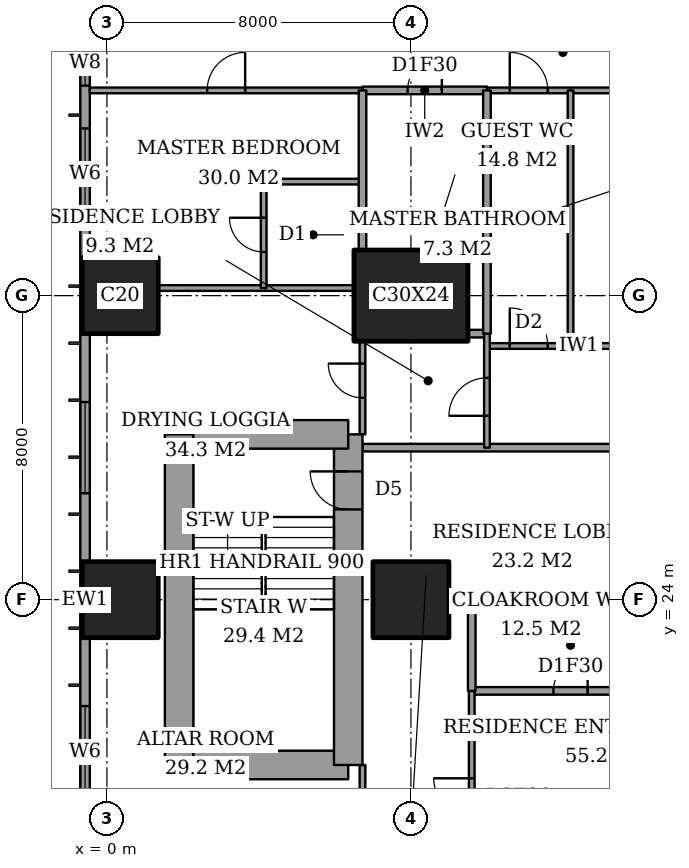
"""IFC4 building model, lengths in metres.
Left out: names, types, materials, properties, quantities, classifications, styles, units other than length and angle.
Written with IfcOpenShell. Run it as: python <this file> out.ifc"""

import sys

from ifc_helpers import new_model, si_unit, direction, frame, frame_2d, origin, origin_2d, place, context, subcontext, project, spatial, rectangle, extrude, element, fill, save


model = new_model("IFC4")
c1 = context("Model", 3, precision=1e-05, world=origin(), true_north=direction((0.0, 1.0)))
c2 = subcontext(c1, "Body", "Model", "MODEL_VIEW")
j1 = project(units=[si_unit("LENGTHUNIT", "METRE"), si_unit("PLANEANGLEUNIT", "RADIAN")], contexts=[c1])
p1 = place(None, origin())
s1 = spatial("IfcSite", under=j1, at=p1, CompositionType="ELEMENT")
p2 = place(p1, origin())
s2 = spatial("IfcBuilding", under=s1, at=p2, CompositionType="ELEMENT")
p3 = place(p2, frame((0.0, 0.0, 87.2)))
s3 = spatial("IfcBuildingStorey", under=s2, at=p3, CompositionType="ELEMENT", Elevation=87.2)
for number, where, z_axis, x_axis in (
    (1, (0.35, 24.0, 0.0), (0.0, 0.0, 1.0), (1.0, 0.0, 0.0)),
    (2, (0.35, 32.0, 0.0), (0.0, 0.0, 1.0), (1.0, 0.0, 0.0)),
    (3, (8.0, 24.0, 0.0), (0.0, 0.0, 1.0), (1.0, 0.0, 0.0)),
):
    element("IfcColumn", number, at=place(p3, frame(where, z_axis=z_axis, x_axis=x_axis)), inside=s3, PredefinedType="COLUMN", context=c2, shape_type="SweptSolid", body=[
        extrude(rectangle(XDim=2.0, YDim=2.0, at=origin_2d()), origin(), (0.0, 0.0, 1.0), 3.6),
    ])
p4 = place(p3, frame((8.0, 32.0, 0.0), z_axis=(0.0, 0.0, 1.0), x_axis=(1.0, 0.0, 0.0)))
e4 = element("IfcColumn", 4, at=p4, inside=s3, PredefinedType="COLUMN", context=c2, shape_type="SweptSolid", body=[
    extrude(rectangle(XDim=3.0, YDim=2.4, at=origin_2d()), origin(), (0.0, 0.0, 1.0), 3.6),
])
p5 = place(p3, frame((1.9, 19.65, 0.0), z_axis=(0.0, 0.0, 1.0), x_axis=(1.0, 0.0, 0.0)))
e5 = element("IfcWall", 5, at=p5, inside=s3, PredefinedType="SHEAR", context=c2, shape_type="SweptSolid", body=[
    extrude(rectangle(XDim=4.45, YDim=0.75, at=frame_2d((2.225, 0.0))), origin(), (0.0, 0.0, 1.0), 3.6),
])
p6 = place(p3, frame((6.35, 19.65, 0.0), z_axis=(0.0, 0.0, 1.0), x_axis=(0.0, 1.0, 0.0)))
e6 = element("IfcWall", 6, at=p6, inside=s3, PredefinedType="SHEAR", context=c2, shape_type="SweptSolid", body=[
    extrude(rectangle(XDim=8.7, YDim=0.75, at=frame_2d((4.35, 0.0))), origin(), (0.0, 0.0, 1.0), 3.6),
])
p7 = place(p6, frame((6.725, 0.0, 0.0)))
e7 = element("IfcOpeningElement", 7, at=p7, cuts=e6, PredefinedType="OPENING", context=c2, shape_type="SweptSolid", body=[
    extrude(rectangle(XDim=1.0, YDim=2.1, at=frame_2d((0.5, 1.05))), frame((0.0, 0.385, 0.0), z_axis=(0.0, -1.0, 0.0), x_axis=(1.0, 0.0, 0.0)), (0.0, 0.0, 1.0), 0.77),
])
p8 = place(p3, frame((6.35, 28.35, 0.0), z_axis=(0.0, 0.0, 1.0), x_axis=(-1.0, 0.0, 0.0)))
e8 = element("IfcWall", 8, at=p8, inside=s3, PredefinedType="SHEAR", context=c2, shape_type="SweptSolid", body=[
    extrude(rectangle(XDim=4.45, YDim=0.75, at=frame_2d((2.225, 0.0))), origin(), (0.0, 0.0, 1.0), 3.6),
])
p9 = place(p3, frame((1.9, 28.35, 0.0), z_axis=(0.0, 0.0, 1.0), x_axis=(0.0, -1.0, 0.0)))
e9 = element("IfcWall", 9, at=p9, inside=s3, PredefinedType="SHEAR", context=c2, shape_type="SweptSolid", body=[
    extrude(rectangle(XDim=8.7, YDim=0.75, at=frame_2d((4.35, 0.0))), origin(), (0.0, 0.0, 1.0), 3.6),
])
p10 = place(p3, frame((-0.575, 44.825, 0.0), z_axis=(0.0, 0.0, 1.0), x_axis=(0.0, -1.0, 0.0)))
e10 = element("IfcWall", 10, at=p10, inside=s3, PredefinedType="SOLIDWALL", context=c2, shape_type="SweptSolid", body=[
    extrude(rectangle(XDim=41.65, YDim=0.25, at=frame_2d((20.825, 0.0))), origin(), (0.0, 0.0, 1.0), 3.6),
])
p11 = place(p10, frame((0.775, 0.0, 0.6)))
e11 = element("IfcOpeningElement", 11, at=p11, cuts=e10, PredefinedType="OPENING", context=c2, shape_type="SweptSolid", body=[
    extrude(rectangle(XDim=2.4, YDim=2.0, at=frame_2d((1.2, 1.0))), frame((0.0, 0.135, 0.0), z_axis=(0.0, -1.0, 0.0), x_axis=(1.0, 0.0, 0.0)), (0.0, 0.0, 1.0), 0.27),
])
p12 = place(p10, frame((6.1, 0.0, 0.6)))
e12 = element("IfcOpeningElement", 12, at=p12, cuts=e10, PredefinedType="OPENING", context=c2, shape_type="SweptSolid", body=[
    extrude(rectangle(XDim=1.2, YDim=2.0, at=frame_2d((0.6, 1.0))), frame((0.0, 0.135, 0.0), z_axis=(0.0, -1.0, 0.0), x_axis=(1.0, 0.0, 0.0)), (0.0, 0.0, 1.0), 0.27),
])
p13 = place(p10, frame((8.425, 0.0, 0.6)))
e13 = element("IfcOpeningElement", 13, at=p13, cuts=e10, PredefinedType="OPENING", context=c2, shape_type="SweptSolid", body=[
    extrude(rectangle(XDim=2.4, YDim=2.0, at=frame_2d((1.2, 1.0))), frame((0.0, 0.135, 0.0), z_axis=(0.0, -1.0, 0.0), x_axis=(1.0, 0.0, 0.0)), (0.0, 0.0, 1.0), 0.27),
])
p14 = place(p10, frame((15.625, 0.0, 0.6)))
e14 = element("IfcOpeningElement", 14, at=p14, cuts=e10, PredefinedType="OPENING", context=c2, shape_type="SweptSolid", body=[
    extrude(rectangle(XDim=2.4, YDim=2.0, at=frame_2d((1.2, 1.0))), frame((0.0, 0.135, 0.0), z_axis=(0.0, -1.0, 0.0), x_axis=(1.0, 0.0, 0.0)), (0.0, 0.0, 1.0), 0.27),
])
p15 = place(p10, frame((23.625, 0.0, 0.6)))
e15 = element("IfcOpeningElement", 15, at=p15, cuts=e10, PredefinedType="OPENING", context=c2, shape_type="SweptSolid", body=[
    extrude(rectangle(XDim=2.4, YDim=2.0, at=frame_2d((1.2, 1.0))), frame((0.0, 0.135, 0.0), z_axis=(0.0, -1.0, 0.0), x_axis=(1.0, 0.0, 0.0)), (0.0, 0.0, 1.0), 0.27),
])
p16 = place(p10, frame((30.825, 0.0, 0.6)))
e16 = element("IfcOpeningElement", 16, at=p16, cuts=e10, PredefinedType="OPENING", context=c2, shape_type="SweptSolid", body=[
    extrude(rectangle(XDim=2.4, YDim=2.0, at=frame_2d((1.2, 1.0))), frame((0.0, 0.135, 0.0), z_axis=(0.0, -1.0, 0.0), x_axis=(1.0, 0.0, 0.0)), (0.0, 0.0, 1.0), 0.27),
])
p17 = place(p10, frame((34.5, 0.0, 0.6)))
e17 = element("IfcOpeningElement", 17, at=p17, cuts=e10, PredefinedType="OPENING", context=c2, shape_type="SweptSolid", body=[
    extrude(rectangle(XDim=1.2, YDim=2.0, at=frame_2d((0.6, 1.0))), frame((0.0, 0.135, 0.0), z_axis=(0.0, -1.0, 0.0), x_axis=(1.0, 0.0, 0.0)), (0.0, 0.0, 1.0), 0.27),
])
p18 = place(p10, frame((38.475, 0.0, 0.6)))
e18 = element("IfcOpeningElement", 18, at=p18, cuts=e10, PredefinedType="OPENING", context=c2, shape_type="SweptSolid", body=[
    extrude(rectangle(XDim=2.4, YDim=2.0, at=frame_2d((1.2, 1.0))), frame((0.0, 0.135, 0.0), z_axis=(0.0, -1.0, 0.0), x_axis=(1.0, 0.0, 0.0)), (0.0, 0.0, 1.0), 0.27),
])
p19 = place(p3, frame((9.6, 21.6, 0.0), z_axis=(0.0, 0.0, 1.0), x_axis=(1.0, 0.0, 0.0)))
e19 = element("IfcWall", 19, at=p19, inside=s3, PredefinedType="PARTITIONING", context=c2, shape_type="SweptSolid", body=[
    extrude(rectangle(XDim=5.2, YDim=0.2, at=frame_2d((2.6, 0.0))), origin(), (0.0, 0.0, 1.0), 3.25),
])
p20 = place(p19, frame((2.15, 0.0, 0.0)))
e20 = element("IfcOpeningElement", 20, at=p20, cuts=e19, PredefinedType="OPENING", context=c2, shape_type="SweptSolid", body=[
    extrude(rectangle(XDim=0.9, YDim=2.1, at=frame_2d((0.45, 1.05))), frame((0.0, 0.11, 0.0), z_axis=(0.0, -1.0, 0.0), x_axis=(1.0, 0.0, 0.0)), (0.0, 0.0, 1.0), 0.22),
])
p21 = place(p3, frame((9.0, 24.0, 0.0), z_axis=(0.0, 0.0, 1.0), x_axis=(1.0, 0.0, 0.0)))
e21 = element("IfcWall", 21, at=p21, inside=s3, PredefinedType="PARTITIONING", context=c2, shape_type="SweptSolid", body=[
    extrude(rectangle(XDim=6.0, YDim=0.2, at=frame_2d((3.0, 0.0))), origin(), (0.0, 0.0, 1.0), 3.25),
])
p22 = place(p3, frame((6.725, 28.0, 0.0), z_axis=(0.0, 0.0, 1.0), x_axis=(1.0, 0.0, 0.0)))
e22 = element("IfcWall", 22, at=p22, inside=s3, PredefinedType="PARTITIONING", context=c2, shape_type="SweptSolid", body=[
    extrude(rectangle(XDim=17.275, YDim=0.2, at=frame_2d((8.637, 0.0))), origin(), (0.0, 0.0, 1.0), 3.25),
])
p23 = place(p22, frame((6.675, 0.0, 0.0)))
e23 = element("IfcOpeningElement", 23, at=p23, cuts=e22, PredefinedType="OPENING", context=c2, shape_type="SweptSolid", body=[
    extrude(rectangle(XDim=1.2, YDim=2.4, at=frame_2d((0.6, 1.2))), frame((0.0, 0.11, 0.0), z_axis=(0.0, -1.0, 0.0), x_axis=(1.0, 0.0, 0.0)), (0.0, 0.0, 1.0), 0.22),
])
p24 = place(p3, frame((10.0, 30.675, 0.0), z_axis=(0.0, 0.0, 1.0), x_axis=(1.0, 0.0, 0.0)))
e24 = element("IfcWall", 24, at=p24, inside=s3, PredefinedType="PARTITIONING", context=c2, shape_type="SweptSolid", body=[
    extrude(rectangle(XDim=4.4, YDim=0.15, at=frame_2d((2.2, 0.0))), origin(), (0.0, 0.0, 1.0), 3.25),
])
p25 = place(p24, frame((0.6, 0.0, 0.0)))
e25 = element("IfcOpeningElement", 25, at=p25, cuts=e24, PredefinedType="OPENING", context=c2, shape_type="SweptSolid", body=[
    extrude(rectangle(XDim=1.0, YDim=2.1, at=frame_2d((0.5, 1.05))), frame((0.0, 0.085, 0.0), z_axis=(0.0, -1.0, 0.0), x_axis=(1.0, 0.0, 0.0)), (0.0, 0.0, 1.0), 0.17),
])
p26 = place(p3, frame((9.5, 31.0, 0.0), z_axis=(0.0, 0.0, 1.0), x_axis=(1.0, 0.0, 0.0)))
e26 = element("IfcWall", 26, at=p26, inside=s3, PredefinedType="PARTITIONING", context=c2, shape_type="SweptSolid", body=[
    extrude(rectangle(XDim=0.5, YDim=0.2, at=frame_2d((0.25, 0.0))), origin(), (0.0, 0.0, 1.0), 3.25),
])
p27 = place(p3, frame((1.35, 32.2, 0.0), z_axis=(0.0, 0.0, 1.0), x_axis=(1.0, 0.0, 0.0)))
e27 = element("IfcWall", 27, at=p27, inside=s3, PredefinedType="PARTITIONING", context=c2, shape_type="SweptSolid", body=[
    extrude(rectangle(XDim=5.15, YDim=0.15, at=frame_2d((2.575, 0.0))), origin(), (0.0, 0.0, 1.0), 3.25),
])
p28 = place(p3, frame((4.125, 35.0, 0.0), z_axis=(0.0, 0.0, 1.0), x_axis=(1.0, 0.0, 0.0)))
e28 = element("IfcWall", 28, at=p28, inside=s3, PredefinedType="PARTITIONING", context=c2, shape_type="SweptSolid", body=[
    extrude(rectangle(XDim=2.6, YDim=0.15, at=frame_2d((1.3, 0.0))), origin(), (0.0, 0.0, 1.0), 3.25),
])
p29 = place(p3, frame((6.725, 37.4, 0.0), z_axis=(0.0, 0.0, 1.0), x_axis=(1.0, 0.0, 0.0)))
e29 = element("IfcWall", 29, at=p29, inside=s3, PredefinedType="PARTITIONING", context=c2, shape_type="SweptSolid", body=[
    extrude(rectangle(XDim=3.275, YDim=0.2, at=frame_2d((1.637, 0.0))), origin(), (0.0, 0.0, 1.0), 3.25),
])
p30 = place(p29, frame((1.188, 0.0, 0.0)))
e30 = element("IfcOpeningElement", 30, at=p30, cuts=e29, PredefinedType="OPENING", context=c2, shape_type="SweptSolid", body=[
    extrude(rectangle(XDim=0.9, YDim=2.1, at=frame_2d((0.45, 1.05))), frame((0.0, 0.11, 0.0), z_axis=(0.0, -1.0, 0.0), x_axis=(1.0, 0.0, 0.0)), (0.0, 0.0, 1.0), 0.22),
])
p31 = place(p3, frame((-0.45, 37.4, 0.0), z_axis=(0.0, 0.0, 1.0), x_axis=(1.0, 0.0, 0.0)))
e31 = element("IfcWall", 31, at=p31, inside=s3, PredefinedType="PARTITIONING", context=c2, shape_type="SweptSolid", body=[
    extrude(rectangle(XDim=7.175, YDim=0.15, at=frame_2d((3.587, 0.0))), origin(), (0.0, 0.0, 1.0), 3.25),
])
p32 = place(p31, frame((3.087, 0.0, 0.0)))
e32 = element("IfcOpeningElement", 32, at=p32, cuts=e31, PredefinedType="OPENING", context=c2, shape_type="SweptSolid", body=[
    extrude(rectangle(XDim=1.0, YDim=2.1, at=frame_2d((0.5, 1.05))), frame((0.0, 0.085, 0.0), z_axis=(0.0, -1.0, 0.0), x_axis=(1.0, 0.0, 0.0)), (0.0, 0.0, 1.0), 0.17),
])
p33 = place(p3, frame((10.0, 37.4, 0.0), z_axis=(0.0, 0.0, 1.0), x_axis=(1.0, 0.0, 0.0)))
e33 = element("IfcWall", 33, at=p33, inside=s3, PredefinedType="PARTITIONING", context=c2, shape_type="SweptSolid", body=[
    extrude(rectangle(XDim=14.561, YDim=0.15, at=frame_2d((7.281, 0.0))), origin(), (0.0, 0.0, 1.0), 3.25),
])
p34 = place(p33, frame((0.6, 0.0, 0.0)))
e34 = element("IfcOpeningElement", 34, at=p34, cuts=e33, PredefinedType="OPENING", context=c2, shape_type="SweptSolid", body=[
    extrude(rectangle(XDim=1.0, YDim=2.1, at=frame_2d((0.5, 1.05))), frame((0.0, 0.085, 0.0), z_axis=(0.0, -1.0, 0.0), x_axis=(1.0, 0.0, 0.0)), (0.0, 0.0, 1.0), 0.17),
])
p35 = place(p33, frame((4.6, 0.0, 0.0)))
e35 = element("IfcOpeningElement", 35, at=p35, cuts=e33, PredefinedType="OPENING", context=c2, shape_type="SweptSolid", body=[
    extrude(rectangle(XDim=1.0, YDim=2.1, at=frame_2d((0.5, 1.05))), frame((0.0, 0.085, 0.0), z_axis=(0.0, -1.0, 0.0), x_axis=(1.0, 0.0, 0.0)), (0.0, 0.0, 1.0), 0.17),
])
p36 = place(p33, frame((10.725, 0.0, 0.0)))
e36 = element("IfcOpeningElement", 36, at=p36, cuts=e33, PredefinedType="OPENING", context=c2, shape_type="SweptSolid", body=[
    extrude(rectangle(XDim=1.0, YDim=2.1, at=frame_2d((0.5, 1.05))), frame((0.0, 0.085, 0.0), z_axis=(0.0, -1.0, 0.0), x_axis=(1.0, 0.0, 0.0)), (0.0, 0.0, 1.0), 0.17),
])
p37 = place(p3, frame((4.125, 32.2, 0.0), z_axis=(0.0, 0.0, 1.0), x_axis=(0.0, 1.0, 0.0)))
e37 = element("IfcWall", 37, at=p37, inside=s3, PredefinedType="PARTITIONING", context=c2, shape_type="SweptSolid", body=[
    extrude(rectangle(XDim=2.8, YDim=0.15, at=frame_2d((1.4, 0.0))), origin(), (0.0, 0.0, 1.0), 3.25),
])
p38 = place(p37, frame((0.95, 0.0, 0.0)))
e38 = element("IfcOpeningElement", 38, at=p38, cuts=e37, PredefinedType="OPENING", context=c2, shape_type="SweptSolid", body=[
    extrude(rectangle(XDim=0.9, YDim=2.1, at=frame_2d((0.45, 1.05))), frame((0.0, 0.085, 0.0), z_axis=(0.0, -1.0, 0.0), x_axis=(1.0, 0.0, 0.0)), (0.0, 0.0, 1.0), 0.17),
])
p39 = place(p3, frame((6.725, 33.2, 0.0), z_axis=(0.0, 0.0, 1.0), x_axis=(0.0, 1.0, 0.0)))
e39 = element("IfcWall", 39, at=p39, inside=s3, PredefinedType="PARTITIONING", context=c2, shape_type="SweptSolid", body=[
    extrude(rectangle(XDim=4.2, YDim=0.2, at=frame_2d((2.1, 0.0))), origin(), (0.0, 0.0, 1.0), 3.25),
])
p40 = place(p3, frame((6.725, 17.2, 0.0), z_axis=(0.0, 0.0, 1.0), x_axis=(0.0, 1.0, 0.0)))
e40 = element("IfcWall", 40, at=p40, inside=s3, PredefinedType="PARTITIONING", context=c2, shape_type="SweptSolid", body=[
    extrude(rectangle(XDim=2.45, YDim=0.15, at=frame_2d((1.225, 0.0))), origin(), (0.0, 0.0, 1.0), 3.25),
])
p41 = place(p40, frame((0.538, 0.0, 0.0)))
e41 = element("IfcOpeningElement", 41, at=p41, cuts=e40, PredefinedType="OPENING", context=c2, shape_type="SweptSolid", body=[
    extrude(rectangle(XDim=1.0, YDim=2.1, at=frame_2d((0.5, 1.05))), frame((0.0, 0.085, 0.0), z_axis=(0.0, -1.0, 0.0), x_axis=(1.0, 0.0, 0.0)), (0.0, 0.0, 1.0), 0.17),
])
p42 = place(p3, frame((6.725, 28.35, 0.0), z_axis=(0.0, 0.0, 1.0), x_axis=(0.0, 1.0, 0.0)))
e42 = element("IfcWall", 42, at=p42, inside=s3, PredefinedType="PARTITIONING", context=c2, shape_type="SweptSolid", body=[
    extrude(rectangle(XDim=2.45, YDim=0.15, at=frame_2d((1.225, 0.0))), origin(), (0.0, 0.0, 1.0), 3.25),
])
p43 = place(p42, frame((0.962, 0.0, 0.0)))
e43 = element("IfcOpeningElement", 43, at=p43, cuts=e42, PredefinedType="OPENING", context=c2, shape_type="SweptSolid", body=[
    extrude(rectangle(XDim=0.9, YDim=2.1, at=frame_2d((0.45, 1.05))), frame((0.0, 0.085, 0.0), z_axis=(0.0, -1.0, 0.0), x_axis=(1.0, 0.0, 0.0)), (0.0, 0.0, 1.0), 0.17),
])
p44 = place(p3, frame((9.6, 21.6, 0.0), z_axis=(0.0, 0.0, 1.0), x_axis=(0.0, 1.0, 0.0)))
e44 = element("IfcWall", 44, at=p44, inside=s3, PredefinedType="PARTITIONING", context=c2, shape_type="SweptSolid", body=[
    extrude(rectangle(XDim=2.4, YDim=0.2, at=frame_2d((1.2, 0.0))), origin(), (0.0, 0.0, 1.0), 3.25),
])
p45 = place(p3, frame((9.6, 10.6, 0.0), z_axis=(0.0, 0.0, 1.0), x_axis=(0.0, 1.0, 0.0)))
e45 = element("IfcWall", 45, at=p45, inside=s3, PredefinedType="PARTITIONING", context=c2, shape_type="SweptSolid", body=[
    extrude(rectangle(XDim=11.0, YDim=0.15, at=frame_2d((5.5, 0.0))), origin(), (0.0, 0.0, 1.0), 3.25),
])
p46 = place(p45, frame((7.7, 0.0, 0.0)))
e46 = element("IfcOpeningElement", 46, at=p46, cuts=e45, PredefinedType="OPENING", context=c2, shape_type="SweptSolid", body=[
    extrude(rectangle(XDim=1.0, YDim=2.1, at=frame_2d((0.5, 1.05))), frame((0.0, 0.085, 0.0), z_axis=(0.0, -1.0, 0.0), x_axis=(1.0, 0.0, 0.0)), (0.0, 0.0, 1.0), 0.17),
])
p47 = place(p3, frame((10.0, 31.0, 0.0), z_axis=(0.0, 0.0, 1.0), x_axis=(0.0, 1.0, 0.0)))
e47 = element("IfcWall", 47, at=p47, inside=s3, PredefinedType="PARTITIONING", context=c2, shape_type="SweptSolid", body=[
    extrude(rectangle(XDim=6.4, YDim=0.2, at=frame_2d((3.2, 0.0))), origin(), (0.0, 0.0, 1.0), 3.25),
])
p48 = place(p3, frame((10.0, 28.0, 0.0), z_axis=(0.0, 0.0, 1.0), x_axis=(0.0, 1.0, 0.0)))
e48 = element("IfcWall", 48, at=p48, inside=s3, PredefinedType="PARTITIONING", context=c2, shape_type="SweptSolid", body=[
    extrude(rectangle(XDim=3.0, YDim=0.15, at=frame_2d((1.5, 0.0))), origin(), (0.0, 0.0, 1.0), 3.25),
])
p49 = place(p48, frame((0.837, 0.0, 0.0)))
e49 = element("IfcOpeningElement", 49, at=p49, cuts=e48, PredefinedType="OPENING", context=c2, shape_type="SweptSolid", body=[
    extrude(rectangle(XDim=1.0, YDim=2.1, at=frame_2d((0.5, 1.05))), frame((0.0, 0.085, 0.0), z_axis=(0.0, -1.0, 0.0), x_axis=(1.0, 0.0, 0.0)), (0.0, 0.0, 1.0), 0.17),
])
p50 = place(p3, frame((12.2, 30.675, 0.0), z_axis=(0.0, 0.0, 1.0), x_axis=(0.0, 1.0, 0.0)))
e50 = element("IfcWall", 50, at=p50, inside=s3, PredefinedType="PARTITIONING", context=c2, shape_type="SweptSolid", body=[
    extrude(rectangle(XDim=6.725, YDim=0.15, at=frame_2d((3.362, 0.0))), origin(), (0.0, 0.0, 1.0), 3.25),
])
p51 = place(p12, origin())
e51 = element("IfcWindow", 51, at=p51, inside=s3, PartitioningType="SINGLE_PANEL", PredefinedType="WINDOW", context=c2, shape_type="SweptSolid", body=[
    extrude(rectangle(XDim=1.2, YDim=2.0, at=frame_2d((0.6, 1.0))), frame((0.0, 0.03, 0.0), z_axis=(0.0, -1.0, 0.0), x_axis=(1.0, 0.0, 0.0)), (0.0, 0.0, 1.0), 0.06),
])
fill(e12, e51)
p52 = place(p13, origin())
e52 = element("IfcWindow", 52, at=p52, inside=s3, PartitioningType="SINGLE_PANEL", PredefinedType="WINDOW", context=c2, shape_type="SweptSolid", body=[
    extrude(rectangle(XDim=2.4, YDim=2.0, at=frame_2d((1.2, 1.0))), frame((0.0, 0.03, 0.0), z_axis=(0.0, -1.0, 0.0), x_axis=(1.0, 0.0, 0.0)), (0.0, 0.0, 1.0), 0.06),
])
fill(e13, e52)
p53 = place(p14, origin())
e53 = element("IfcWindow", 53, at=p53, inside=s3, PartitioningType="SINGLE_PANEL", PredefinedType="WINDOW", context=c2, shape_type="SweptSolid", body=[
    extrude(rectangle(XDim=2.4, YDim=2.0, at=frame_2d((1.2, 1.0))), frame((0.0, 0.03, 0.0), z_axis=(0.0, -1.0, 0.0), x_axis=(1.0, 0.0, 0.0)), (0.0, 0.0, 1.0), 0.06),
])
fill(e14, e53)
p54 = place(p15, origin())
e54 = element("IfcWindow", 54, at=p54, inside=s3, PartitioningType="SINGLE_PANEL", PredefinedType="WINDOW", context=c2, shape_type="SweptSolid", body=[
    extrude(rectangle(XDim=2.4, YDim=2.0, at=frame_2d((1.2, 1.0))), frame((0.0, 0.03, 0.0), z_axis=(0.0, -1.0, 0.0), x_axis=(1.0, 0.0, 0.0)), (0.0, 0.0, 1.0), 0.06),
])
fill(e15, e54)
p55 = place(p46, origin())
e55 = element("IfcDoor", 55, at=p55, inside=s3, OperationType="SINGLE_SWING_LEFT", PredefinedType="DOOR", context=c2, shape_type="SweptSolid", body=[
    extrude(rectangle(XDim=1.0, YDim=2.1, at=frame_2d((0.5, 1.05))), frame((0.0, 0.025, 0.0), z_axis=(0.0, -1.0, 0.0), x_axis=(1.0, 0.0, 0.0)), (0.0, 0.0, 1.0), 0.05),
])
fill(e46, e55)
p56 = place(p20, origin())
e56 = element("IfcDoor", 56, at=p56, inside=s3, OperationType="SINGLE_SWING_LEFT", PredefinedType="DOOR", context=c2, shape_type="SweptSolid", body=[
    extrude(rectangle(XDim=0.9, YDim=2.1, at=frame_2d((0.45, 1.05))), frame((0.0, 0.025, 0.0), z_axis=(0.0, -1.0, 0.0), x_axis=(1.0, 0.0, 0.0)), (0.0, 0.0, 1.0), 0.05),
])
fill(e20, e56)
p57 = place(p34, origin())
e57 = element("IfcDoor", 57, at=p57, inside=s3, OperationType="SINGLE_SWING_RIGHT", PredefinedType="DOOR", context=c2, shape_type="SweptSolid", body=[
    extrude(rectangle(XDim=1.0, YDim=2.1, at=frame_2d((0.5, 1.05))), frame((0.0, 0.025, 0.0), z_axis=(0.0, -1.0, 0.0), x_axis=(1.0, 0.0, 0.0)), (0.0, 0.0, 1.0), 0.05),
])
fill(e34, e57)
p58 = place(p38, origin())
e58 = element("IfcDoor", 58, at=p58, inside=s3, OperationType="SINGLE_SWING_LEFT", PredefinedType="DOOR", context=c2, shape_type="SweptSolid", body=[
    extrude(rectangle(XDim=0.9, YDim=2.1, at=frame_2d((0.45, 1.05))), frame((0.0, 0.025, 0.0), z_axis=(0.0, -1.0, 0.0), x_axis=(1.0, 0.0, 0.0)), (0.0, 0.0, 1.0), 0.05),
])
fill(e38, e58)
p59 = place(p32, origin())
e59 = element("IfcDoor", 59, at=p59, inside=s3, OperationType="SINGLE_SWING_LEFT", PredefinedType="DOOR", context=c2, shape_type="SweptSolid", body=[
    extrude(rectangle(XDim=1.0, YDim=2.1, at=frame_2d((0.5, 1.05))), frame((0.0, 0.025, 0.0), z_axis=(0.0, -1.0, 0.0), x_axis=(1.0, 0.0, 0.0)), (0.0, 0.0, 1.0), 0.05),
])
fill(e32, e59)
p60 = place(p43, origin())
e60 = element("IfcDoor", 60, at=p60, inside=s3, OperationType="SINGLE_SWING_LEFT", PredefinedType="DOOR", context=c2, shape_type="SweptSolid", body=[
    extrude(rectangle(XDim=0.9, YDim=2.1, at=frame_2d((0.45, 1.05))), frame((0.0, 0.025, 0.0), z_axis=(0.0, -1.0, 0.0), x_axis=(1.0, 0.0, 0.0)), (0.0, 0.0, 1.0), 0.05),
])
fill(e43, e60)
p61 = place(p30, origin())
e61 = element("IfcDoor", 61, at=p61, inside=s3, OperationType="SINGLE_SWING_LEFT", PredefinedType="DOOR", context=c2, shape_type="SweptSolid", body=[
    extrude(rectangle(XDim=0.9, YDim=2.1, at=frame_2d((0.45, 1.05))), frame((0.0, 0.025, 0.0), z_axis=(0.0, -1.0, 0.0), x_axis=(1.0, 0.0, 0.0)), (0.0, 0.0, 1.0), 0.05),
])
fill(e30, e61)
p62 = place(p49, origin())
e62 = element("IfcDoor", 62, at=p62, inside=s3, OperationType="SINGLE_SWING_RIGHT", PredefinedType="DOOR", context=c2, shape_type="SweptSolid", body=[
    extrude(rectangle(XDim=1.0, YDim=2.1, at=frame_2d((0.5, 1.05))), frame((0.0, 0.025, 0.0), z_axis=(0.0, -1.0, 0.0), x_axis=(1.0, 0.0, 0.0)), (0.0, 0.0, 1.0), 0.05),
])
fill(e49, e62)
p63 = place(p25, origin())
e63 = element("IfcDoor", 63, at=p63, inside=s3, OperationType="SINGLE_SWING_RIGHT", PredefinedType="DOOR", context=c2, shape_type="SweptSolid", body=[
    extrude(rectangle(XDim=1.0, YDim=2.1, at=frame_2d((0.5, 1.05))), frame((0.0, 0.025, 0.0), z_axis=(0.0, -1.0, 0.0), x_axis=(1.0, 0.0, 0.0)), (0.0, 0.0, 1.0), 0.05),
])
fill(e25, e63)
p64 = place(p7, origin())
e64 = element("IfcDoor", 64, at=p64, inside=s3, OperationType="SINGLE_SWING_LEFT", PredefinedType="DOOR", context=c2, shape_type="SweptSolid", body=[
    extrude(rectangle(XDim=1.0, YDim=2.1, at=frame_2d((0.5, 1.05))), frame((0.0, 0.025, 0.0), z_axis=(0.0, -1.0, 0.0), x_axis=(1.0, 0.0, 0.0)), (0.0, 0.0, 1.0), 0.05),
])
fill(e7, e64)
save(model, sys.argv[1])
